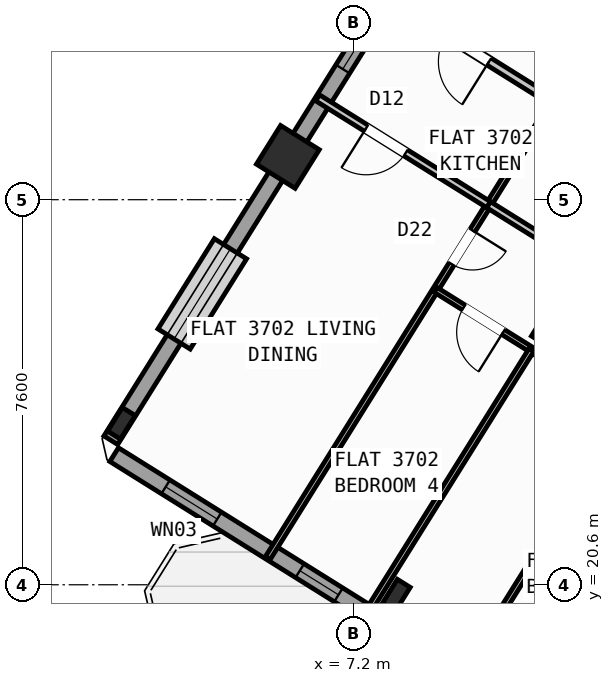
"""IFC4 building model, lengths in metres.
Left out: names, types, materials, properties, quantities, classifications, styles, units other than length and angle.
Written with IfcOpenShell. Run it as: python <this file> out.ifc"""

import sys

from ifc_helpers import new_model, si_unit, direction, frame, frame_2d, origin, origin_2d, place, context, subcontext, project, spatial, rectangle, hollow_rectangle, i_section, extrude, source, transform, mapped, element, fill, save


model = new_model("IFC4")
c1 = context("Model", 3, precision=1e-05, world=origin(), true_north=direction((0.0, 1.0)))
c2 = subcontext(c1, "Body", "Model", "MODEL_VIEW")
j1 = project(units=[si_unit("LENGTHUNIT", "METRE"), si_unit("PLANEANGLEUNIT", "RADIAN")], contexts=[c1])
p1 = place(None, origin())
s1 = spatial("IfcSite", under=j1, at=p1, CompositionType="ELEMENT")
p2 = place(p1, origin())
s2 = spatial("IfcBuilding", under=s1, at=p2, CompositionType="ELEMENT")
p3 = place(p2, frame((0.0, 0.0, 147.9)))
s3 = spatial("IfcBuildingStorey", under=s2, at=p3, CompositionType="ELEMENT", Elevation=147.9)
m1 = source(origin(), c2, "Body", "SweptSolid", [
    extrude(hollow_rectangle(XDim=0.9, YDim=0.9, WallThickness=0.036, at=origin_2d()), origin(), (0.0, 0.0, 1.0), 3.6),
])
p4 = place(p3, frame((11.336, 25.653, 0.0), z_axis=(0.0, 0.0, 1.0), x_axis=(-0.848048096156, 0.529919264233, 0.0)))
e1 = element("IfcColumn", 1, at=p4, inside=s3, PredefinedType="COLUMN", context=c2, shape_type="MappedRepresentation", body=[
    mapped(m1, transform((0.0, 0.0, 0.0), scale=1.0)),
])
m2 = source(origin(), c2, "Body", "SweptSolid", [
    extrude(i_section(OverallWidth=0.3, OverallDepth=0.55, WebThickness=0.015, FlangeThickness=0.029, at=origin_2d()), origin(), (0.0, 0.0, 1.0), 3.6),
])
p5 = place(p3, frame((8.051, 20.395, 0.0), z_axis=(0.0, 0.0, 1.0), x_axis=(-0.848048096156, 0.529919264233, 0.0)))
e2 = element("IfcColumn", 2, at=p5, inside=s3, PredefinedType="COLUMN", context=c2, shape_type="MappedRepresentation", body=[
    mapped(m2, transform((0.0, 0.0, 0.0), scale=1.0)),
])
p6 = place(p3, frame((5.909, 29.044, 0.0), z_axis=(0.0, 0.0, 1.0), x_axis=(-0.848048096156, 0.529919264233, 0.0)))
e3 = element("IfcColumn", 3, at=p6, inside=s3, PredefinedType="COLUMN", context=c2, shape_type="MappedRepresentation", body=[
    mapped(m1, transform((0.0, 0.0, 0.0), scale=1.0)),
])
p7 = place(p3, frame((2.623, 23.786, 0.0), z_axis=(0.0, 0.0, 1.0), x_axis=(-0.848048096156, 0.529919264233, 0.0)))
e4 = element("IfcColumn", 4, at=p7, inside=s3, PredefinedType="COLUMN", context=c2, shape_type="MappedRepresentation", body=[
    mapped(m2, transform((0.0, 0.0, 0.0), scale=1.0)),
])
p8 = place(p3, frame((29.268, 6.429, 0.0), z_axis=(0.0, 0.0, 1.0), x_axis=(-0.848049971435, 0.529916263149, 0.0)))
e5 = element("IfcWall", 5, at=p8, inside=s3, PredefinedType="STANDARD", context=c2, shape_type="SweptSolid", body=[
    extrude(rectangle(XDim=31.588, YDim=0.32, at=frame_2d((15.794, 0.0))), origin(), (0.0, 0.0, 1.0), 3.35),
])
p9 = place(p8, frame((16.362, 0.0, 0.0)))
e6 = element("IfcOpeningElement", 6, at=p9, cuts=e5, PredefinedType="OPENING", context=c2, shape_type="SweptSolid", body=[
    extrude(rectangle(XDim=1.2, YDim=2.15, at=frame_2d((0.6, 1.075))), frame((0.0, 0.17, 0.0), z_axis=(0.0, -1.0, 0.0), x_axis=(1.0, 0.0, 0.0)), (0.0, 0.0, 1.0), 0.34),
])
p10 = place(p8, frame((2.989, 0.0, 0.8)))
e7 = element("IfcOpeningElement", 7, at=p10, cuts=e5, PredefinedType="OPENING", context=c2, shape_type="SweptSolid", body=[
    extrude(rectangle(XDim=2.1, YDim=1.55, at=frame_2d((1.05, 0.775))), frame((0.0, 0.17, 0.0), z_axis=(0.0, -1.0, 0.0), x_axis=(1.0, 0.0, 0.0)), (0.0, 0.0, 1.0), 0.34),
])
p11 = place(p8, frame((8.359, 0.0, 0.8)))
e8 = element("IfcOpeningElement", 8, at=p11, cuts=e5, PredefinedType="OPENING", context=c2, shape_type="SweptSolid", body=[
    extrude(rectangle(XDim=2.1, YDim=1.55, at=frame_2d((1.05, 0.775))), frame((0.0, 0.17, 0.0), z_axis=(0.0, -1.0, 0.0), x_axis=(1.0, 0.0, 0.0)), (0.0, 0.0, 1.0), 0.34),
])
p12 = place(p8, frame((13.284, 0.0, 0.95)))
e9 = element("IfcOpeningElement", 9, at=p12, cuts=e5, PredefinedType="OPENING", context=c2, shape_type="SweptSolid", body=[
    extrude(rectangle(XDim=1.2, YDim=1.4, at=frame_2d((0.6, 0.7))), frame((0.0, 0.17, 0.0), z_axis=(0.0, -1.0, 0.0), x_axis=(1.0, 0.0, 0.0)), (0.0, 0.0, 1.0), 0.34),
])
p13 = place(p8, frame((29.188, 0.0, 0.95)))
e10 = element("IfcOpeningElement", 10, at=p13, cuts=e5, PredefinedType="OPENING", context=c2, shape_type="SweptSolid", body=[
    extrude(rectangle(XDim=1.2, YDim=1.4, at=frame_2d((0.6, 0.7))), frame((0.0, 0.17, 0.0), z_axis=(0.0, -1.0, 0.0), x_axis=(1.0, 0.0, 0.0)), (0.0, 0.0, 1.0), 0.34),
])
p14 = place(p8, frame((19.674, 0.0, 1.0)))
e11 = element("IfcOpeningElement", 11, at=p14, cuts=e5, PredefinedType="OPENING", context=c2, shape_type="SweptSolid", body=[
    extrude(rectangle(XDim=0.9, YDim=1.25, at=frame_2d((0.45, 0.625))), frame((0.0, 0.17, 0.0), z_axis=(0.0, -1.0, 0.0), x_axis=(1.0, 0.0, 0.0)), (0.0, 0.0, 1.0), 0.34),
])
p15 = place(p8, frame((21.896, 0.0, 1.0)))
e12 = element("IfcOpeningElement", 12, at=p15, cuts=e5, PredefinedType="OPENING", context=c2, shape_type="SweptSolid", body=[
    extrude(rectangle(XDim=0.9, YDim=1.25, at=frame_2d((0.45, 0.625))), frame((0.0, 0.17, 0.0), z_axis=(0.0, -1.0, 0.0), x_axis=(1.0, 0.0, 0.0)), (0.0, 0.0, 1.0), 0.34),
])
p16 = place(p8, frame((24.106, 0.0, 1.0)))
e13 = element("IfcOpeningElement", 13, at=p16, cuts=e5, PredefinedType="OPENING", context=c2, shape_type="SweptSolid", body=[
    extrude(rectangle(XDim=0.65, YDim=1.15, at=frame_2d((0.325, 0.575))), frame((0.0, 0.17, 0.0), z_axis=(0.0, -1.0, 0.0), x_axis=(1.0, 0.0, 0.0)), (0.0, 0.0, 1.0), 0.34),
])
p17 = place(p8, frame((26.366, 0.0, 1.0)))
e14 = element("IfcOpeningElement", 14, at=p17, cuts=e5, PredefinedType="OPENING", context=c2, shape_type="SweptSolid", body=[
    extrude(rectangle(XDim=0.9, YDim=1.25, at=frame_2d((0.45, 0.625))), frame((0.0, 0.17, 0.0), z_axis=(0.0, -1.0, 0.0), x_axis=(1.0, 0.0, 0.0)), (0.0, 0.0, 1.0), 0.34),
])
p18 = place(p3, frame((2.415, 23.452, 0.0), z_axis=(0.0, 0.0, 1.0), x_axis=(0.52991049553, 0.848053575387, 0.0)))
e15 = element("IfcWall", 15, at=p18, inside=s3, PredefinedType="STANDARD", context=c2, shape_type="SweptSolid", body=[
    extrude(rectangle(XDim=21.587, YDim=0.32, at=frame_2d((10.794, 0.0))), origin(), (0.0, 0.0, 1.0), 2.775),
])
p19 = place(p18, frame((2.356, 0.0, 0.8)))
e16 = element("IfcOpeningElement", 16, at=p19, cuts=e15, PredefinedType="OPENING", context=c2, shape_type="SweptSolid", body=[
    extrude(rectangle(XDim=2.1, YDim=1.55, at=frame_2d((1.05, 0.775))), frame((0.0, 0.17, 0.0), z_axis=(0.0, -1.0, 0.0), x_axis=(1.0, 0.0, 0.0)), (0.0, 0.0, 1.0), 0.34),
])
p20 = place(p18, frame((8.639, 0.0, 1.0)))
e17 = element("IfcOpeningElement", 17, at=p20, cuts=e15, PredefinedType="OPENING", context=c2, shape_type="SweptSolid", body=[
    extrude(rectangle(XDim=0.9, YDim=1.25, at=frame_2d((0.45, 0.625))), frame((0.0, 0.17, 0.0), z_axis=(0.0, -1.0, 0.0), x_axis=(1.0, 0.0, 0.0)), (0.0, 0.0, 1.0), 0.34),
])
p21 = place(p18, frame((17.744, 0.0, 0.85)))
e18 = element("IfcOpeningElement", 18, at=p21, cuts=e15, PredefinedType="OPENING", context=c2, shape_type="SweptSolid", body=[
    extrude(rectangle(XDim=1.5, YDim=1.5, at=frame_2d((0.75, 0.75))), frame((0.0, 0.17, 0.0), z_axis=(0.0, -1.0, 0.0), x_axis=(1.0, 0.0, 0.0)), (0.0, 0.0, 1.0), 0.34),
])
p22 = place(p3, frame((23.104, 25.256, 0.0), z_axis=(0.0, 0.0, 1.0), x_axis=(-0.848041752158, 0.529929416617, 0.0)))
e19 = element("IfcWall", 19, at=p22, inside=s3, PredefinedType="PARTITIONING", context=c2, shape_type="SweptSolid", body=[
    extrude(rectangle(XDim=16.73, YDim=0.16, at=frame_2d((8.365, 0.0))), origin(), (0.0, 0.0, 1.0), 3.34),
])
p23 = place(p22, frame((2.22, 0.0, 0.0)))
e20 = element("IfcOpeningElement", 20, at=p23, cuts=e19, PredefinedType="OPENING", context=c2, shape_type="SweptSolid", body=[
    extrude(rectangle(XDim=0.86, YDim=2.05, at=frame_2d((0.43, 1.025))), frame((0.0, 0.09, 0.0), z_axis=(0.0, -1.0, 0.0), x_axis=(1.0, 0.0, 0.0)), (0.0, 0.0, 1.0), 0.18),
])
p24 = place(p22, frame((12.084, 0.0, 0.0)))
e21 = element("IfcOpeningElement", 21, at=p24, cuts=e19, PredefinedType="OPENING", context=c2, shape_type="SweptSolid", body=[
    extrude(rectangle(XDim=1.0, YDim=2.1, at=frame_2d((0.5, 1.05))), frame((0.0, 0.09, 0.0), z_axis=(0.0, -1.0, 0.0), x_axis=(1.0, 0.0, 0.0)), (0.0, 0.0, 1.0), 0.18),
])
p25 = place(p3, frame((21.938, 23.391, 0.0), z_axis=(0.0, 0.0, 1.0), x_axis=(-0.848045850158, 0.529922858565, 0.0)))
e22 = element("IfcWall", 22, at=p25, inside=s3, PredefinedType="PARTITIONING", context=c2, shape_type="SweptSolid", body=[
    extrude(rectangle(XDim=16.73, YDim=0.16, at=frame_2d((8.365, 0.0))), origin(), (0.0, 0.0, 1.0), 3.34),
])
p26 = place(p25, frame((2.22, 0.0, 0.0)))
e23 = element("IfcOpeningElement", 23, at=p26, cuts=e22, PredefinedType="OPENING", context=c2, shape_type="SweptSolid", body=[
    extrude(rectangle(XDim=0.86, YDim=2.05, at=frame_2d((0.43, 1.025))), frame((0.0, 0.09, 0.0), z_axis=(0.0, -1.0, 0.0), x_axis=(1.0, 0.0, 0.0)), (0.0, 0.0, 1.0), 0.18),
])
p27 = place(p25, frame((14.22, 0.0, 0.0)))
e24 = element("IfcOpeningElement", 24, at=p27, cuts=e22, PredefinedType="OPENING", context=c2, shape_type="SweptSolid", body=[
    extrude(rectangle(XDim=1.0, YDim=2.1, at=frame_2d((0.5, 1.05))), frame((0.0, 0.09, 0.0), z_axis=(0.0, -1.0, 0.0), x_axis=(1.0, 0.0, 0.0)), (0.0, 0.0, 1.0), 0.18),
])
p28 = place(p3, frame((11.143, 30.136, 0.0), z_axis=(0.0, 0.0, 1.0), x_axis=(-0.529922479612, -0.848046086956, 0.0)))
e25 = element("IfcWall", 25, at=p28, inside=s3, PredefinedType="PARTITIONING", context=c2, shape_type="SweptSolid", body=[
    extrude(rectangle(XDim=10.62, YDim=0.11, at=frame_2d((5.31, 0.0))), origin(), (0.0, 0.0, 1.0), 3.34),
])
p29 = place(p28, frame((3.0, 0.0, 0.0)))
e26 = element("IfcOpeningElement", 26, at=p29, cuts=e25, PredefinedType="OPENING", context=c2, shape_type="SweptSolid", body=[
    extrude(rectangle(XDim=0.78, YDim=2.05, at=frame_2d((0.39, 1.025))), frame((0.0, 0.065, 0.0), z_axis=(0.0, -1.0, 0.0), x_axis=(1.0, 0.0, 0.0)), (0.0, 0.0, 1.0), 0.13),
])
p30 = place(p3, frame((9.871, 28.101, 0.0), z_axis=(0.0, 0.0, 1.0), x_axis=(-0.848025873403, 0.529954826413, 0.0)))
e27 = element("IfcWall", 27, at=p30, inside=s3, PredefinedType="PLUMBINGWALL", context=c2, shape_type="SweptSolid", body=[
    extrude(rectangle(XDim=3.98, YDim=0.14, at=frame_2d((1.99, 0.0))), origin(), (0.0, 0.0, 1.0), 3.34),
])
p31 = place(p30, frame((1.93, 0.0, 0.0)))
e28 = element("IfcOpeningElement", 28, at=p31, cuts=e27, PredefinedType="OPENING", context=c2, shape_type="SweptSolid", body=[
    extrude(rectangle(XDim=0.92, YDim=2.08, at=frame_2d((0.46, 1.04))), frame((0.0, 0.08, 0.0), z_axis=(0.0, -1.0, 0.0), x_axis=(1.0, 0.0, 0.0)), (0.0, 0.0, 1.0), 0.16),
])
p32 = place(p3, frame((17.452, 23.364, 0.0), z_axis=(0.0, 0.0, 1.0), x_axis=(-0.848044326704, 0.52992529657, 0.0)))
e29 = element("IfcWall", 29, at=p32, inside=s3, PredefinedType="PLUMBINGWALL", context=c2, shape_type="SweptSolid", body=[
    extrude(rectangle(XDim=8.94, YDim=0.14, at=frame_2d((4.47, 0.0))), origin(), (0.0, 0.0, 1.0), 3.34),
])
p33 = place(p32, frame((5.087, 0.0, 0.0)))
e30 = element("IfcOpeningElement", 30, at=p33, cuts=e29, PredefinedType="OPENING", context=c2, shape_type="SweptSolid", body=[
    extrude(rectangle(XDim=0.78, YDim=2.05, at=frame_2d((0.39, 1.025))), frame((0.0, 0.08, 0.0), z_axis=(0.0, -1.0, 0.0), x_axis=(1.0, 0.0, 0.0)), (0.0, 0.0, 1.0), 0.16),
])
p34 = place(p32, frame((1.218, 0.0, 0.0)))
e31 = element("IfcOpeningElement", 31, at=p34, cuts=e29, PredefinedType="OPENING", context=c2, shape_type="SweptSolid", body=[
    extrude(rectangle(XDim=0.78, YDim=2.05, at=frame_2d((0.39, 1.025))), frame((0.0, 0.08, 0.0), z_axis=(0.0, -1.0, 0.0), x_axis=(1.0, 0.0, 0.0)), (0.0, 0.0, 1.0), 0.16),
])
p35 = place(p3, frame((16.403, 21.685, 0.0), z_axis=(0.0, 0.0, 1.0), x_axis=(-0.848044326704, 0.52992529657, 0.0)))
e32 = element("IfcWall", 32, at=p35, inside=s3, PredefinedType="PARTITIONING", context=c2, shape_type="SweptSolid", body=[
    extrude(rectangle(XDim=8.94, YDim=0.11, at=frame_2d((4.47, 0.0))), origin(), (0.0, 0.0, 1.0), 3.34),
])
p36 = place(p35, frame((0.657, 0.0, 0.0)))
e33 = element("IfcOpeningElement", 33, at=p36, cuts=e32, PredefinedType="OPENING", context=c2, shape_type="SweptSolid", body=[
    extrude(rectangle(XDim=0.92, YDim=2.08, at=frame_2d((0.46, 1.04))), frame((0.0, 0.065, 0.0), z_axis=(0.0, -1.0, 0.0), x_axis=(1.0, 0.0, 0.0)), (0.0, 0.0, 1.0), 0.13),
])
p37 = place(p35, frame((2.893, 0.0, 0.0)))
e34 = element("IfcOpeningElement", 34, at=p37, cuts=e32, PredefinedType="OPENING", context=c2, shape_type="SweptSolid", body=[
    extrude(rectangle(XDim=0.92, YDim=2.08, at=frame_2d((0.46, 1.04))), frame((0.0, 0.065, 0.0), z_axis=(0.0, -1.0, 0.0), x_axis=(1.0, 0.0, 0.0)), (0.0, 0.0, 1.0), 0.13),
])
p38 = place(p35, frame((5.008, 0.0, 0.0)))
e35 = element("IfcOpeningElement", 35, at=p38, cuts=e32, PredefinedType="OPENING", context=c2, shape_type="SweptSolid", body=[
    extrude(rectangle(XDim=0.92, YDim=2.08, at=frame_2d((0.46, 1.04))), frame((0.0, 0.065, 0.0), z_axis=(0.0, -1.0, 0.0), x_axis=(1.0, 0.0, 0.0)), (0.0, 0.0, 1.0), 0.13),
])
p39 = place(p35, frame((7.363, 0.0, 0.0)))
e36 = element("IfcOpeningElement", 36, at=p39, cuts=e32, PredefinedType="OPENING", context=c2, shape_type="SweptSolid", body=[
    extrude(rectangle(XDim=0.92, YDim=2.08, at=frame_2d((0.46, 1.04))), frame((0.0, 0.065, 0.0), z_axis=(0.0, -1.0, 0.0), x_axis=(1.0, 0.0, 0.0)), (0.0, 0.0, 1.0), 0.13),
])
p40 = place(p3, frame((12.613, 24.053, 0.0), z_axis=(0.0, 0.0, 1.0), x_axis=(-0.529900466106, -0.848059842241, 0.0)))
e37 = element("IfcWall", 37, at=p40, inside=s3, PredefinedType="PARTITIONING", context=c2, shape_type="SweptSolid", body=[
    extrude(rectangle(XDim=6.24, YDim=0.11, at=frame_2d((3.12, 0.0))), origin(), (0.0, 0.0, 1.0), 2.995),
])
p41 = place(p3, frame((10.717, 25.238, 0.0), z_axis=(0.0, 0.0, 1.0), x_axis=(-0.52991804857, -0.848048855786, 0.0)))
e38 = element("IfcWall", 38, at=p41, inside=s3, PredefinedType="PARTITIONING", context=c2, shape_type="SweptSolid", body=[
    extrude(rectangle(XDim=6.24, YDim=0.11, at=frame_2d((3.12, 0.0))), origin(), (0.0, 0.0, 1.0), 3.34),
])
m3 = source(origin(), c2, "Body", "SweptSolid", [
    extrude(rectangle(XDim=1.2, YDim=1.4, at=frame_2d((0.6, 0.7))), frame((0.0, 0.03, 0.0), z_axis=(0.0, -1.0, 0.0), x_axis=(1.0, 0.0, 0.0)), (0.0, 0.0, 1.0), 0.06),
])
p42 = place(p13, origin())
e39 = element("IfcWindow", 39, at=p42, inside=s3, PartitioningType="SINGLE_PANEL", PredefinedType="WINDOW", context=c2, shape_type="MappedRepresentation", body=[
    mapped(m3, transform((0.0, 0.0, 0.0), scale=1.0)),
])
fill(e10, e39)
m4 = source(origin(), c2, "Body", "SweptSolid", [
    extrude(rectangle(XDim=2.1, YDim=1.55, at=frame_2d((1.05, 0.775))), frame((0.0, 0.03, 0.0), z_axis=(0.0, -1.0, 0.0), x_axis=(1.0, 0.0, 0.0)), (0.0, 0.0, 1.0), 0.06),
])
p43 = place(p19, origin())
e40 = element("IfcWindow", 40, at=p43, inside=s3, PartitioningType="SINGLE_PANEL", PredefinedType="WINDOW", context=c2, shape_type="MappedRepresentation", body=[
    mapped(m4, transform((0.0, 0.0, 0.0), scale=1.0)),
])
fill(e16, e40)
m5 = source(origin(), c2, "Body", "SweptSolid", [
    extrude(rectangle(XDim=0.9, YDim=1.25, at=frame_2d((0.45, 0.625))), frame((0.0, 0.03, 0.0), z_axis=(0.0, -1.0, 0.0), x_axis=(1.0, 0.0, 0.0)), (0.0, 0.0, 1.0), 0.06),
])
p44 = place(p20, origin())
e41 = element("IfcWindow", 41, at=p44, inside=s3, PartitioningType="SINGLE_PANEL", PredefinedType="WINDOW", context=c2, shape_type="MappedRepresentation", body=[
    mapped(m5, transform((0.0, 0.0, 0.0), scale=1.0)),
])
fill(e17, e41)
p45 = place(p17, origin())
e42 = element("IfcWindow", 42, at=p45, inside=s3, PartitioningType="SINGLE_PANEL", PredefinedType="WINDOW", context=c2, shape_type="MappedRepresentation", body=[
    mapped(m5, transform((0.0, 0.0, 0.0), scale=1.0)),
])
fill(e14, e42)
m6 = source(origin(), c2, "Body", "SweptSolid", [
    extrude(rectangle(XDim=1.0, YDim=2.1, at=frame_2d((0.5, 1.05))), frame((0.0, 0.025, 0.0), z_axis=(0.0, -1.0, 0.0), x_axis=(1.0, 0.0, 0.0)), (0.0, 0.0, 1.0), 0.05),
])
p46 = place(p27, origin())
e43 = element("IfcDoor", 43, at=p46, inside=s3, OperationType="SINGLE_SWING_LEFT", PredefinedType="DOOR", context=c2, shape_type="MappedRepresentation", body=[
    mapped(m6, transform((0.0, 0.0, 0.0), scale=1.0)),
])
fill(e24, e43)
m7 = source(origin(), c2, "Body", "SweptSolid", [
    extrude(rectangle(XDim=0.92, YDim=2.08, at=frame_2d((0.46, 1.04))), frame((0.0, 0.025, 0.0), z_axis=(0.0, -1.0, 0.0), x_axis=(1.0, 0.0, 0.0)), (0.0, 0.0, 1.0), 0.05),
])
p47 = place(p31, origin())
e44 = element("IfcDoor", 44, at=p47, inside=s3, OperationType="SINGLE_SWING_RIGHT", PredefinedType="DOOR", context=c2, shape_type="MappedRepresentation", body=[
    mapped(m7, transform((0.0, 0.0, 0.0), scale=1.0)),
])
fill(e28, e44)
m8 = source(origin(), c2, "Body", "SweptSolid", [
    extrude(rectangle(XDim=0.78, YDim=2.05, at=frame_2d((0.39, 1.025))), frame((0.0, 0.025, 0.0), z_axis=(0.0, -1.0, 0.0), x_axis=(1.0, 0.0, 0.0)), (0.0, 0.0, 1.0), 0.05),
])
p48 = place(p29, origin())
e45 = element("IfcDoor", 45, at=p48, inside=s3, OperationType="SINGLE_SWING_LEFT", PredefinedType="DOOR", context=c2, shape_type="MappedRepresentation", body=[
    mapped(m8, transform((0.0, 0.0, 0.0), scale=1.0)),
])
fill(e26, e45)
p49 = place(p39, origin())
e46 = element("IfcDoor", 46, at=p49, inside=s3, OperationType="SINGLE_SWING_LEFT", PredefinedType="DOOR", context=c2, shape_type="MappedRepresentation", body=[
    mapped(m7, transform((0.0, 0.0, 0.0), scale=1.0)),
])
fill(e36, e46)
save(model, sys.argv[1])
